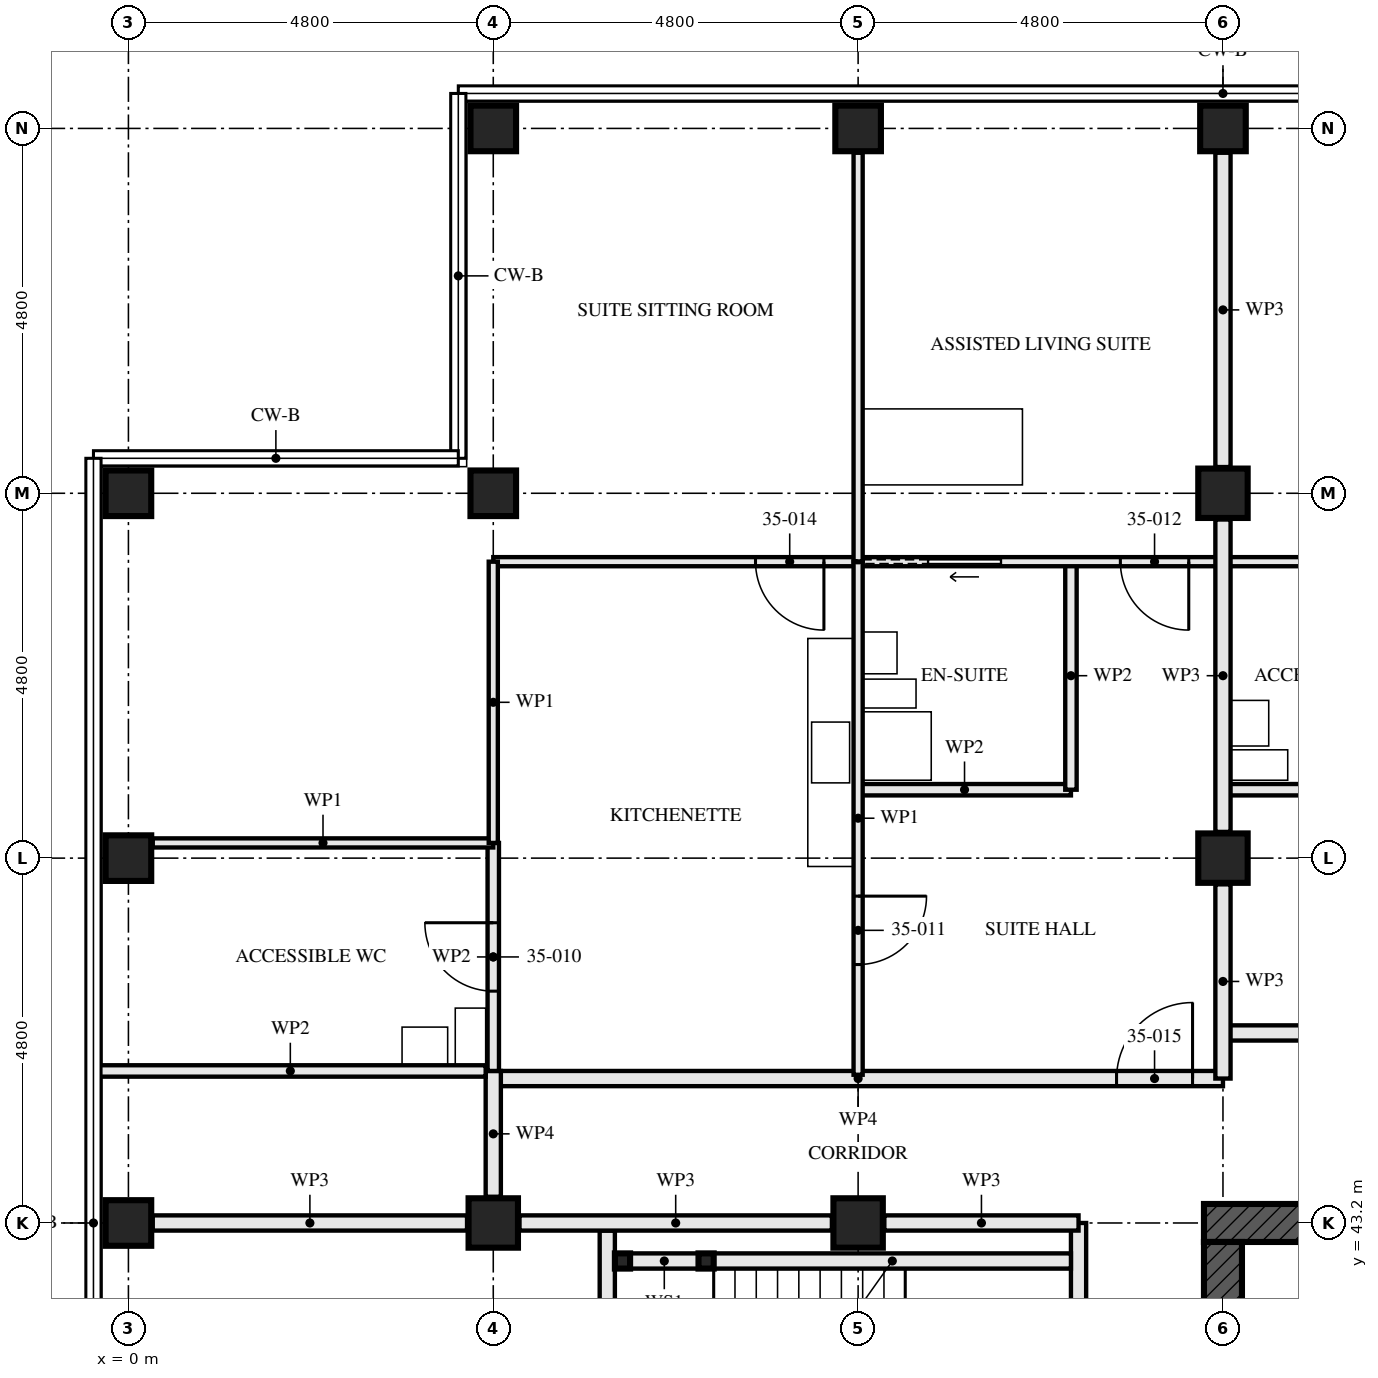
"""IFC4 building model, lengths in metres.
Left out: names, types, materials, properties, quantities, classifications, styles, units other than length and angle.
Written with IfcOpenShell. Run it as: python <this file> out.ifc"""

import sys

from ifc_helpers import new_model, si_unit, direction, frame, frame_2d, origin, origin_2d, place, context, subcontext, project, spatial, rectangle, hollow_rectangle, extrude, element, fill, save


model = new_model("IFC4")
c1 = context("Model", 3, precision=1e-05, world=origin(), true_north=direction((0.0, 1.0)))
c2 = subcontext(c1, "Body", "Model", "MODEL_VIEW")
j1 = project(units=[si_unit("LENGTHUNIT", "METRE"), si_unit("PLANEANGLEUNIT", "RADIAN")], contexts=[c1])
p1 = place(None, origin())
s1 = spatial("IfcSite", under=j1, at=p1, CompositionType="ELEMENT")
p2 = place(p1, origin())
s2 = spatial("IfcBuilding", under=s1, at=p2, CompositionType="ELEMENT")
p3 = place(p2, frame((0.0, 0.0, 129.5)))
s3 = spatial("IfcBuildingStorey", under=s2, at=p3, CompositionType="ELEMENT", Elevation=129.5)
for number, where, z_axis, x_axis in (
    (1, (0.0, 43.2, 0.0), (0.0, 0.0, 1.0), (0.0, 1.0, 0.0)),
    (2, (0.0, 48.0, 0.0), (0.0, 0.0, 1.0), (1.0, 0.0, 0.0)),
    (3, (0.0, 52.8, 0.0), (0.0, 0.0, 1.0), (0.0, 1.0, 0.0)),
):
    element("IfcColumn", number, at=place(p3, frame(where, z_axis=z_axis, x_axis=x_axis)), inside=s3, PredefinedType="COLUMN", context=c2, shape_type="SweptSolid", body=[
        extrude(hollow_rectangle(XDim=0.6, YDim=0.6, WallThickness=0.08, at=origin_2d()), origin(), (0.0, 0.0, 1.0), 3.5),
    ])
p4 = place(p3, frame((4.8, 43.2, 0.0), z_axis=(0.0, 0.0, 1.0), x_axis=(0.0, 1.0, 0.0)))
e4 = element("IfcColumn", 4, at=p4, inside=s3, PredefinedType="COLUMN", context=c2, shape_type="SweptSolid", body=[
    extrude(hollow_rectangle(XDim=0.65, YDim=0.65, WallThickness=0.05, at=origin_2d()), origin(), (0.0, 0.0, 1.0), 3.5),
])
for number, where, z_axis, x_axis in (
    (5, (4.8, 52.8, 0.0), (0.0, 0.0, 1.0), (0.0, 1.0, 0.0)),
    (6, (4.8, 57.6, 0.0), (0.0, 0.0, 1.0), (0.0, 1.0, 0.0)),
):
    element("IfcColumn", number, at=place(p3, frame(where, z_axis=z_axis, x_axis=x_axis)), inside=s3, PredefinedType="COLUMN", context=c2, shape_type="SweptSolid", body=[
        extrude(hollow_rectangle(XDim=0.6, YDim=0.6, WallThickness=0.08, at=origin_2d()), origin(), (0.0, 0.0, 1.0), 3.5),
    ])
p5 = place(p3, frame((9.6, 43.2, 0.0), z_axis=(0.0, 0.0, 1.0), x_axis=(0.0, 1.0, 0.0)))
e7 = element("IfcColumn", 7, at=p5, inside=s3, PredefinedType="COLUMN", context=c2, shape_type="SweptSolid", body=[
    extrude(hollow_rectangle(XDim=0.65, YDim=0.65, WallThickness=0.05, at=origin_2d()), origin(), (0.0, 0.0, 1.0), 3.5),
])
p6 = place(p3, frame((9.6, 57.6, 0.0), z_axis=(0.0, 0.0, 1.0), x_axis=(0.0, 1.0, 0.0)))
e8 = element("IfcColumn", 8, at=p6, inside=s3, PredefinedType="COLUMN", context=c2, shape_type="SweptSolid", body=[
    extrude(hollow_rectangle(XDim=0.6, YDim=0.6, WallThickness=0.08, at=origin_2d()), origin(), (0.0, 0.0, 1.0), 3.5),
])
for number, where, z_axis, x_axis in (
    (9, (14.4, 48.0, 0.0), (0.0, 0.0, 1.0), (1.0, 0.0, 0.0)),
    (10, (14.4, 52.8, 0.0), (0.0, 0.0, 1.0), (1.0, 0.0, 0.0)),
):
    element("IfcColumn", number, at=place(p3, frame(where, z_axis=z_axis, x_axis=x_axis)), inside=s3, PredefinedType="COLUMN", context=c2, shape_type="SweptSolid", body=[
        extrude(hollow_rectangle(XDim=0.65, YDim=0.65, WallThickness=0.05, at=origin_2d()), origin(), (0.0, 0.0, 1.0), 3.5),
    ])
p7 = place(p3, frame((14.4, 57.6, 0.0), z_axis=(0.0, 0.0, 1.0), x_axis=(0.0, 1.0, 0.0)))
e11 = element("IfcColumn", 11, at=p7, inside=s3, PredefinedType="COLUMN", context=c2, shape_type="SweptSolid", body=[
    extrude(hollow_rectangle(XDim=0.6, YDim=0.6, WallThickness=0.08, at=origin_2d()), origin(), (0.0, 0.0, 1.0), 3.5),
])
p8 = place(p3, frame((29.05, 43.2, -0.17), z_axis=(0.0, 0.0, 1.0), x_axis=(-1.0, 0.0, 0.0)))
e12 = element("IfcWall", 12, at=p8, inside=s3, PredefinedType="SHEAR", context=c2, shape_type="SweptSolid", body=[
    extrude(rectangle(XDim=14.9, YDim=0.5, at=frame_2d((7.45, 0.0))), origin(), (0.0, 0.0, 1.0), 3.5),
])
p9 = place(p8, frame((6.85, 0.0, 0.17)))
e13 = element("IfcOpeningElement", 13, at=p9, cuts=e12, PredefinedType="OPENING", context=c2, shape_type="SweptSolid", body=[
    extrude(rectangle(XDim=1.2, YDim=2.1, at=frame_2d((0.6, 1.05))), frame((0.0, 0.26, 0.0), z_axis=(0.0, -1.0, 0.0), x_axis=(1.0, 0.0, 0.0)), (0.0, 0.0, 1.0), 0.521),
])
p10 = place(p3, frame((14.4, 42.95, -0.17), z_axis=(0.0, 0.0, 1.0), x_axis=(0.0, -1.0, 0.0)))
e14 = element("IfcWall", 14, at=p10, inside=s3, PredefinedType="SHEAR", context=c2, shape_type="SweptSolid", body=[
    extrude(rectangle(XDim=13.9, YDim=0.5, at=frame_2d((6.95, 0.0))), origin(), (0.0, 0.0, 1.0), 3.5),
])
p11 = place(p10, frame((6.35, 0.0, 0.17)))
e15 = element("IfcOpeningElement", 15, at=p11, cuts=e14, PredefinedType="OPENING", context=c2, shape_type="SweptSolid", body=[
    extrude(rectangle(XDim=1.2, YDim=2.1, at=frame_2d((0.6, 1.05))), frame((0.0, 0.26, 0.0), z_axis=(0.0, -1.0, 0.0), x_axis=(1.0, 0.0, 0.0)), (0.0, 0.0, 1.0), 0.521),
])
for number, where, z_axis, x_axis in (
    (16, (6.5, 42.7, 0.0), (0.0, 0.0, 1.0), (1.0, 0.0, 0.0)),
    (17, (7.6, 42.7, 0.0), (0.0, 0.0, 1.0), (1.0, 0.0, 0.0)),
):
    element("IfcColumn", number, at=place(p3, frame(where, z_axis=z_axis, x_axis=x_axis)), inside=s3, PredefinedType="COLUMN", context=c2, shape_type="SweptSolid", body=[
        extrude(hollow_rectangle(XDim=0.2, YDim=0.2, WallThickness=0.008, at=origin_2d()), origin(), (0.0, 0.0, 1.0), 3.33),
    ])
p12 = place(p3, frame((6.6, 42.7, 0.0), z_axis=(0.0, 0.0, 1.0), x_axis=(1.0, 0.0, 0.0)))
e18 = element("IfcWall", 18, at=p12, inside=s3, PredefinedType="SOLIDWALL", context=c2, shape_type="SweptSolid", body=[
    extrude(rectangle(XDim=0.9, YDim=0.2, at=frame_2d((0.45, 0.0))), origin(), (0.0, 0.0, 1.0), 2.99),
])
p13 = place(p3, frame((7.7, 42.7, 0.0), z_axis=(0.0, 0.0, 1.0), x_axis=(1.0, 0.0, 0.0)))
e19 = element("IfcWall", 19, at=p13, inside=s3, PredefinedType="SOLIDWALL", context=c2, shape_type="SweptSolid", body=[
    extrude(rectangle(XDim=4.7, YDim=0.2, at=frame_2d((2.35, 0.0))), origin(), (0.0, 0.0, 1.0), 2.99),
])
p14 = place(p3, frame((6.3, 43.1, 0.0), z_axis=(0.0, 0.0, 1.0), x_axis=(0.0, -1.0, 0.0)))
e20 = element("IfcWall", 20, at=p14, inside=s3, PredefinedType="SOLIDWALL", context=c2, shape_type="SweptSolid", body=[
    extrude(rectangle(XDim=3.3, YDim=0.2, at=frame_2d((1.65, 0.0))), origin(), (0.0, 0.0, 1.0), 3.33),
])
p15 = place(p3, frame((12.5, 43.2, 0.0), z_axis=(0.0, 0.0, 1.0), x_axis=(0.0, -1.0, 0.0)))
e21 = element("IfcWall", 21, at=p15, inside=s3, PredefinedType="PARTITIONING", context=c2, shape_type="SweptSolid", body=[
    extrude(rectangle(XDim=14.84, YDim=0.2, at=frame_2d((7.42, 0.0))), origin(), (0.0, 0.0, 1.0), 2.32),
])
p16 = place(p15, frame((1.4, 0.0, 0.0)))
e22 = element("IfcOpeningElement", 22, at=p16, cuts=e21, PredefinedType="OPENING", context=c2, shape_type="SweptSolid", body=[
    extrude(rectangle(XDim=1.0, YDim=2.1, at=frame_2d((0.5, 1.05))), frame((0.0, 0.111, 0.0), z_axis=(0.0, -1.0, 0.0), x_axis=(1.0, 0.0, 0.0)), (0.0, 0.0, 1.0), 0.221),
])
p17 = place(p15, frame((5.2, 0.0, 0.0)))
e23 = element("IfcOpeningElement", 23, at=p17, cuts=e21, PredefinedType="OPENING", context=c2, shape_type="SweptSolid", body=[
    extrude(rectangle(XDim=1.0, YDim=2.1, at=frame_2d((0.5, 1.05))), frame((0.0, 0.111, 0.0), z_axis=(0.0, -1.0, 0.0), x_axis=(1.0, 0.0, 0.0)), (0.0, 0.0, 1.0), 0.221),
])
p18 = place(p15, frame((13.0, 0.0, 0.0)))
e24 = element("IfcOpeningElement", 24, at=p18, cuts=e21, PredefinedType="OPENING", context=c2, shape_type="SweptSolid", body=[
    extrude(rectangle(XDim=1.0, YDim=2.1, at=frame_2d((0.5, 1.05))), frame((0.0, 0.111, 0.0), z_axis=(0.0, -1.0, 0.0), x_axis=(1.0, 0.0, 0.0)), (0.0, 0.0, 1.0), 0.221),
])
p19 = place(p3, frame((12.4, 51.9, 0.0), z_axis=(0.0, 0.0, 1.0), x_axis=(0.0, -1.0, 0.0)))
e25 = element("IfcWall", 25, at=p19, inside=s3, PredefinedType="PARTITIONING", context=c2, shape_type="SweptSolid", body=[
    extrude(rectangle(XDim=3.0, YDim=0.15, at=frame_2d((1.5, 0.0))), origin(), (0.0, 0.0, 1.0), 3.33),
])
p20 = place(p3, frame((12.4, 48.9, 0.0), z_axis=(0.0, 0.0, 1.0), x_axis=(-1.0, 0.0, 0.0)))
e26 = element("IfcWall", 26, at=p20, inside=s3, PredefinedType="PARTITIONING", context=c2, shape_type="SweptSolid", body=[
    extrude(rectangle(XDim=2.8, YDim=0.15, at=frame_2d((1.4, 0.0))), origin(), (0.0, 0.0, 1.0), 3.33),
])
p21 = place(p3, frame((4.8, 48.2, 0.0), z_axis=(0.0, 0.0, 1.0), x_axis=(0.0, -1.0, 0.0)))
e27 = element("IfcWall", 27, at=p21, inside=s3, PredefinedType="PARTITIONING", context=c2, shape_type="SweptSolid", body=[
    extrude(rectangle(XDim=3.0, YDim=0.15, at=frame_2d((1.5, 0.0))), origin(), (0.0, 0.0, 1.0), 2.55),
])
p22 = place(p21, frame((1.05, 0.0, 0.0)))
e28 = element("IfcOpeningElement", 28, at=p22, cuts=e27, PredefinedType="OPENING", context=c2, shape_type="SweptSolid", body=[
    extrude(rectangle(XDim=0.9, YDim=2.1, at=frame_2d((0.45, 1.05))), frame((0.0, 0.085, 0.0), z_axis=(0.0, -1.0, 0.0), x_axis=(1.0, 0.0, 0.0)), (0.0, 0.0, 1.0), 0.171),
])
p23 = place(p3, frame((9.6, 51.9, 0.0), z_axis=(0.0, 0.0, 1.0), x_axis=(0.0, -1.0, 0.0)))
e29 = element("IfcWall", 29, at=p23, inside=s3, PredefinedType="PARTITIONING", context=c2, shape_type="SweptSolid", body=[
    extrude(rectangle(XDim=6.75, YDim=0.12, at=frame_2d((3.375, 0.0))), origin(), (0.0, 0.0, 1.0), 2.55),
])
p24 = place(p23, frame((4.4, 0.0, 0.0)))
e30 = element("IfcOpeningElement", 30, at=p24, cuts=e29, PredefinedType="OPENING", context=c2, shape_type="SweptSolid", body=[
    extrude(rectangle(XDim=0.9, YDim=2.1, at=frame_2d((0.45, 1.05))), frame((0.0, 0.071, 0.0), z_axis=(0.0, -1.0, 0.0), x_axis=(1.0, 0.0, 0.0)), (0.0, 0.0, 1.0), 0.141),
])
p25 = place(p3, frame((14.4, 51.9, 0.0), z_axis=(0.0, 0.0, 1.0), x_axis=(-1.0, 0.0, 0.0)))
e31 = element("IfcWall", 31, at=p25, inside=s3, PredefinedType="PARTITIONING", context=c2, shape_type="SweptSolid", body=[
    extrude(rectangle(XDim=4.8, YDim=0.12, at=frame_2d((2.4, 0.0))), origin(), (0.0, 0.0, 1.0), 3.33),
])
p26 = place(p25, frame((0.45, 0.0, 0.0)))
e32 = element("IfcOpeningElement", 32, at=p26, cuts=e31, PredefinedType="OPENING", context=c2, shape_type="SweptSolid", body=[
    extrude(rectangle(XDim=0.9, YDim=2.1, at=frame_2d((0.45, 1.05))), frame((0.0, 0.071, 0.0), z_axis=(0.0, -1.0, 0.0), x_axis=(1.0, 0.0, 0.0)), (0.0, 0.0, 1.0), 0.141),
])
p27 = place(p25, frame((2.925, 0.0, 0.0)))
e33 = element("IfcOpeningElement", 33, at=p27, cuts=e31, PredefinedType="OPENING", context=c2, shape_type="SweptSolid", body=[
    extrude(rectangle(XDim=0.95, YDim=2.1, at=frame_2d((0.475, 1.05))), frame((0.0, 0.071, 0.0), z_axis=(0.0, -1.0, 0.0), x_axis=(1.0, 0.0, 0.0)), (0.0, 0.0, 1.0), 0.141),
])
p28 = place(p3, frame((9.6, 51.9, 0.0), z_axis=(0.0, 0.0, 1.0), x_axis=(-1.0, 0.0, 0.0)))
e34 = element("IfcWall", 34, at=p28, inside=s3, PredefinedType="PARTITIONING", context=c2, shape_type="SweptSolid", body=[
    extrude(rectangle(XDim=4.8, YDim=0.12, at=frame_2d((2.4, 0.0))), origin(), (0.0, 0.0, 1.0), 3.33),
])
p29 = place(p28, frame((0.45, 0.0, 0.0)))
e35 = element("IfcOpeningElement", 35, at=p29, cuts=e34, PredefinedType="OPENING", context=c2, shape_type="SweptSolid", body=[
    extrude(rectangle(XDim=0.9, YDim=2.1, at=frame_2d((0.45, 1.05))), frame((0.0, 0.071, 0.0), z_axis=(0.0, -1.0, 0.0), x_axis=(1.0, 0.0, 0.0)), (0.0, 0.0, 1.0), 0.141),
])
p30 = place(p3, frame((4.8, 48.2, 0.0), z_axis=(0.0, 0.0, 1.0), x_axis=(-1.0, 0.0, 0.0)))
e36 = element("IfcWall", 36, at=p30, inside=s3, PredefinedType="PARTITIONING", context=c2, shape_type="SweptSolid", body=[
    extrude(rectangle(XDim=4.48, YDim=0.12, at=frame_2d((2.24, 0.0))), origin(), (0.0, 0.0, 1.0), 3.33),
])
p31 = place(p3, frame((9.6, 57.28, 0.0), z_axis=(0.0, 0.0, 1.0), x_axis=(0.0, -1.0, 0.0)))
e37 = element("IfcWall", 37, at=p31, inside=s3, PredefinedType="PARTITIONING", context=c2, shape_type="SweptSolid", body=[
    extrude(rectangle(XDim=5.38, YDim=0.12, at=frame_2d((2.69, 0.0))), origin(), (0.0, 0.0, 1.0), 2.55),
])
p32 = place(p3, frame((4.8, 51.9, 0.0), z_axis=(0.0, 0.0, 1.0), x_axis=(0.0, -1.0, 0.0)))
e38 = element("IfcWall", 38, at=p32, inside=s3, PredefinedType="PARTITIONING", context=c2, shape_type="SweptSolid", body=[
    extrude(rectangle(XDim=3.7, YDim=0.12, at=frame_2d((1.85, 0.0))), origin(), (0.0, 0.0, 1.0), 3.33),
])
p33 = place(p3, frame((14.4, 45.1, 0.0), z_axis=(0.0, 0.0, 1.0), x_axis=(-1.0, 0.0, 0.0)))
e39 = element("IfcWall", 39, at=p33, inside=s3, PredefinedType="PARTITIONING", context=c2, shape_type="SweptSolid", body=[
    extrude(rectangle(XDim=9.6, YDim=0.2, at=frame_2d((4.8, 0.0))), origin(), (0.0, 0.0, 1.0), 3.33),
])
p34 = place(p33, frame((0.4, 0.0, 0.0)))
e40 = element("IfcOpeningElement", 40, at=p34, cuts=e39, PredefinedType="OPENING", context=c2, shape_type="SweptSolid", body=[
    extrude(rectangle(XDim=1.0, YDim=2.1, at=frame_2d((0.5, 1.05))), frame((0.0, 0.111, 0.0), z_axis=(0.0, -1.0, 0.0), x_axis=(1.0, 0.0, 0.0)), (0.0, 0.0, 1.0), 0.221),
])
p35 = place(p3, frame((4.8, 45.2, 0.0), z_axis=(0.0, 0.0, 1.0), x_axis=(0.0, -1.0, 0.0)))
e41 = element("IfcWall", 41, at=p35, inside=s3, PredefinedType="PARTITIONING", context=c2, shape_type="SweptSolid", body=[
    extrude(rectangle(XDim=1.655, YDim=0.2, at=frame_2d((0.828, 0.0))), origin(), (0.0, 0.0, 1.0), 3.33),
])
p36 = place(p3, frame((17.2, 48.9, 0.0), z_axis=(0.0, 0.0, 1.0), x_axis=(-1.0, 0.0, 0.0)))
e42 = element("IfcWall", 42, at=p36, inside=s3, PredefinedType="PARTITIONING", context=c2, shape_type="SweptSolid", body=[
    extrude(rectangle(XDim=2.8, YDim=0.15, at=frame_2d((1.4, 0.0))), origin(), (0.0, 0.0, 1.0), 3.33),
])
p37 = place(p3, frame((19.2, 51.9, 0.0), z_axis=(0.0, 0.0, 1.0), x_axis=(-1.0, 0.0, 0.0)))
e43 = element("IfcWall", 43, at=p37, inside=s3, PredefinedType="PARTITIONING", context=c2, shape_type="SweptSolid", body=[
    extrude(rectangle(XDim=4.8, YDim=0.12, at=frame_2d((2.4, 0.0))), origin(), (0.0, 0.0, 1.0), 3.33),
])
p38 = place(p3, frame((29.24, 45.7, 0.0), z_axis=(0.0, 0.0, 1.0), x_axis=(-1.0, 0.0, 0.0)))
e44 = element("IfcWall", 44, at=p38, inside=s3, PredefinedType="PARTITIONING", context=c2, shape_type="SweptSolid", body=[
    extrude(rectangle(XDim=14.84, YDim=0.2, at=frame_2d((7.42, 0.0))), origin(), (0.0, 0.0, 1.0), 2.32),
])
p39 = place(p38, frame((5.64, 0.0, 0.0)))
e45 = element("IfcOpeningElement", 45, at=p39, cuts=e44, PredefinedType="OPENING", context=c2, shape_type="SweptSolid", body=[
    extrude(rectangle(XDim=1.0, YDim=2.1, at=frame_2d((0.5, 1.05))), frame((0.0, 0.111, 0.0), z_axis=(0.0, -1.0, 0.0), x_axis=(1.0, 0.0, 0.0)), (0.0, 0.0, 1.0), 0.221),
])
p40 = place(p3, frame((12.5, 43.2, 0.0), z_axis=(0.0, 0.0, 1.0), x_axis=(-1.0, 0.0, 0.0)))
e46 = element("IfcWall", 46, at=p40, inside=s3, PredefinedType="PARTITIONING", context=c2, shape_type="SweptSolid", body=[
    extrude(rectangle(XDim=2.555, YDim=0.2, at=frame_2d((1.277, 0.0))), origin(), (0.0, 0.0, 1.0), 2.32),
])
p41 = place(p3, frame((9.255, 43.2, 0.0), z_axis=(0.0, 0.0, 1.0), x_axis=(-1.0, 0.0, 0.0)))
e47 = element("IfcWall", 47, at=p41, inside=s3, PredefinedType="PARTITIONING", context=c2, shape_type="SweptSolid", body=[
    extrude(rectangle(XDim=4.11, YDim=0.2, at=frame_2d((2.055, 0.0))), origin(), (0.0, 0.0, 1.0), 2.32),
])
p42 = place(p3, frame((4.455, 43.2, 0.0), z_axis=(0.0, 0.0, 1.0), x_axis=(-1.0, 0.0, 0.0)))
e48 = element("IfcWall", 48, at=p42, inside=s3, PredefinedType="PARTITIONING", context=c2, shape_type="SweptSolid", body=[
    extrude(rectangle(XDim=4.135, YDim=0.2, at=frame_2d((2.067, 0.0))), origin(), (0.0, 0.0, 1.0), 2.32),
])
p43 = place(p3, frame((14.4, 45.1, 0.0), z_axis=(0.0, 0.0, 1.0), x_axis=(0.0, 1.0, 0.0)))
e49 = element("IfcWall", 49, at=p43, inside=s3, PredefinedType="PARTITIONING", context=c2, shape_type="SweptSolid", body=[
    extrude(rectangle(XDim=2.555, YDim=0.2, at=frame_2d((1.277, 0.0))), origin(), (0.0, 0.0, 1.0), 2.32),
])
p44 = place(p3, frame((14.4, 48.345, 0.0), z_axis=(0.0, 0.0, 1.0), x_axis=(0.0, 1.0, 0.0)))
e50 = element("IfcWall", 50, at=p44, inside=s3, PredefinedType="PARTITIONING", context=c2, shape_type="SweptSolid", body=[
    extrude(rectangle(XDim=4.11, YDim=0.2, at=frame_2d((2.055, 0.0))), origin(), (0.0, 0.0, 1.0), 2.32),
])
p45 = place(p3, frame((14.4, 53.145, 0.0), z_axis=(0.0, 0.0, 1.0), x_axis=(0.0, 1.0, 0.0)))
e51 = element("IfcWall", 51, at=p45, inside=s3, PredefinedType="PARTITIONING", context=c2, shape_type="SweptSolid", body=[
    extrude(rectangle(XDim=4.135, YDim=0.2, at=frame_2d((2.067, 0.0))), origin(), (0.0, 0.0, 1.0), 2.32),
])
p46 = place(p3, frame((4.7, 45.2, 0.0), z_axis=(0.0, 0.0, 1.0), x_axis=(-1.0, 0.0, 0.0)))
e52 = element("IfcWall", 52, at=p46, inside=s3, PredefinedType="PARTITIONING", context=c2, shape_type="SweptSolid", body=[
    extrude(rectangle(XDim=5.14, YDim=0.15, at=frame_2d((2.57, 0.0))), origin(), (0.0, 0.0, 1.0), 2.32),
])
p47 = place(p22, frame((0.9, 0.0, 0.0), z_axis=(0.0, 0.0, 1.0), x_axis=(-1.0, 0.0, 0.0)))
e53 = element("IfcDoor", 53, at=p47, inside=s3, OperationType="SINGLE_SWING_LEFT", PredefinedType="DOOR", context=c2, shape_type="SweptSolid", body=[
    extrude(rectangle(XDim=0.9, YDim=2.1, at=frame_2d((0.45, 1.05))), frame((0.0, 0.022, 0.0), z_axis=(0.0, -1.0, 0.0), x_axis=(1.0, 0.0, 0.0)), (0.0, 0.0, 1.0), 0.044),
])
fill(e28, e53)
p48 = place(p24, origin())
e54 = element("IfcDoor", 54, at=p48, inside=s3, OperationType="SINGLE_SWING_RIGHT", PredefinedType="DOOR", context=c2, shape_type="SweptSolid", body=[
    extrude(rectangle(XDim=0.9, YDim=2.1, at=frame_2d((0.45, 1.05))), frame((0.0, 0.022, 0.0), z_axis=(0.0, -1.0, 0.0), x_axis=(1.0, 0.0, 0.0)), (0.0, 0.0, 1.0), 0.044),
])
fill(e30, e54)
p49 = place(p26, origin())
e55 = element("IfcDoor", 55, at=p49, inside=s3, OperationType="SINGLE_SWING_RIGHT", PredefinedType="DOOR", context=c2, shape_type="SweptSolid", body=[
    extrude(rectangle(XDim=0.9, YDim=2.1, at=frame_2d((0.45, 1.05))), frame((0.0, 0.022, 0.0), z_axis=(0.0, -1.0, 0.0), x_axis=(1.0, 0.0, 0.0)), (0.0, 0.0, 1.0), 0.044),
])
fill(e32, e55)
p50 = place(p27, origin())
e56 = element("IfcDoor", 56, at=p50, inside=s3, OperationType="SLIDING_TO_LEFT", PredefinedType="DOOR", context=c2, shape_type="SweptSolid", body=[
    extrude(rectangle(XDim=0.95, YDim=2.1, at=frame_2d((0.475, 1.05))), frame((0.0, 0.022, 0.0), z_axis=(0.0, -1.0, 0.0), x_axis=(1.0, 0.0, 0.0)), (0.0, 0.0, 1.0), 0.044),
])
fill(e33, e56)
p51 = place(p29, origin())
e57 = element("IfcDoor", 57, at=p51, inside=s3, OperationType="SINGLE_SWING_RIGHT", PredefinedType="DOOR", context=c2, shape_type="SweptSolid", body=[
    extrude(rectangle(XDim=0.9, YDim=2.1, at=frame_2d((0.45, 1.05))), frame((0.0, 0.022, 0.0), z_axis=(0.0, -1.0, 0.0), x_axis=(1.0, 0.0, 0.0)), (0.0, 0.0, 1.0), 0.044),
])
fill(e35, e57)
p52 = place(p34, frame((1.0, 0.0, 0.0), z_axis=(0.0, 0.0, 1.0), x_axis=(-1.0, 0.0, 0.0)))
e58 = element("IfcDoor", 58, at=p52, inside=s3, OperationType="SINGLE_SWING_LEFT", PredefinedType="DOOR", context=c2, shape_type="SweptSolid", body=[
    extrude(rectangle(XDim=1.0, YDim=2.1, at=frame_2d((0.5, 1.05))), frame((0.0, 0.027, 0.0), z_axis=(0.0, -1.0, 0.0), x_axis=(1.0, 0.0, 0.0)), (0.0, 0.0, 1.0), 0.054),
])
fill(e40, e58)
save(model, sys.argv[1])
